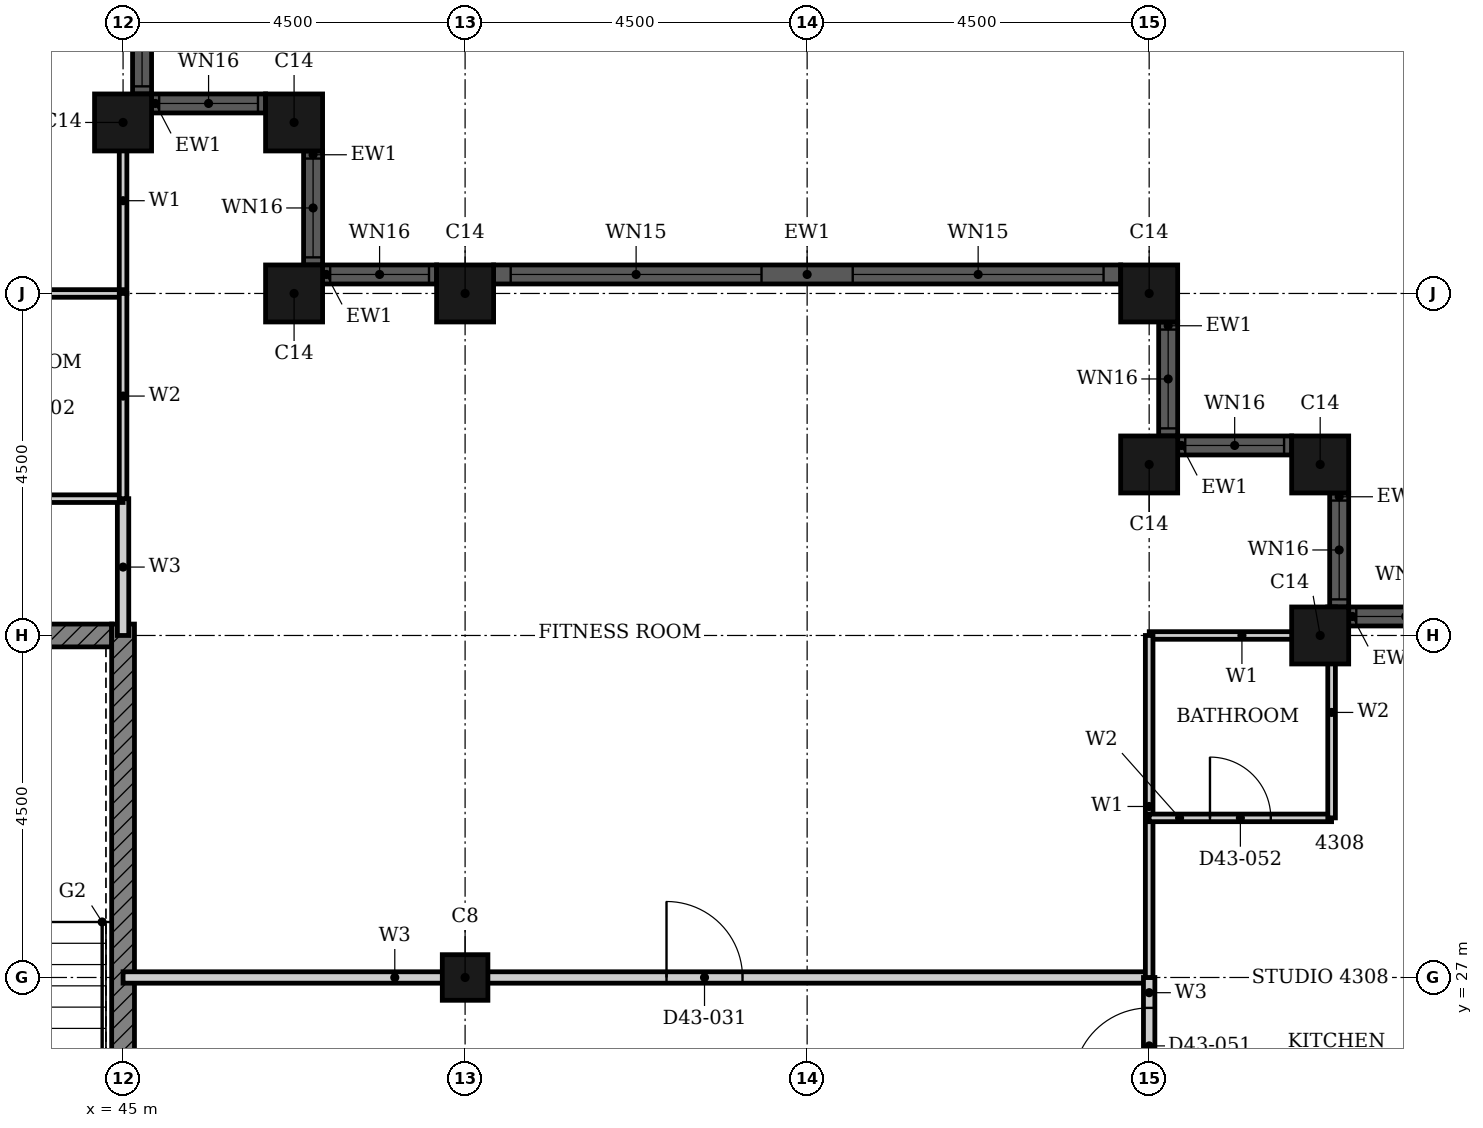
"""IFC4 building model, lengths in metres.
Left out: names, types, materials, properties, quantities, classifications, styles, units other than length and angle.
Written with IfcOpenShell. Run it as: python <this file> out.ifc"""

import sys

from ifc_helpers import new_model, si_unit, direction, frame, frame_2d, origin, origin_2d, place, context, subcontext, project, spatial, rectangle, hollow_rectangle, extrude, element, fill, save


model = new_model("IFC4")
c1 = context("Model", 3, precision=1e-05, world=origin(), true_north=direction((0.0, 1.0)))
c2 = subcontext(c1, "Body", "Model", "MODEL_VIEW")
j1 = project(units=[si_unit("LENGTHUNIT", "METRE"), si_unit("PLANEANGLEUNIT", "RADIAN")], contexts=[c1])
p1 = place(None, origin())
s1 = spatial("IfcSite", under=j1, at=p1, CompositionType="ELEMENT")
p2 = place(p1, origin())
s2 = spatial("IfcBuilding", under=s1, at=p2, CompositionType="ELEMENT")
p3 = place(p2, frame((0.0, 0.0, 172.8)))
s3 = spatial("IfcBuildingStorey", under=s2, at=p3, CompositionType="ELEMENT", Elevation=172.8)
for number, where, z_axis, x_axis in (
    (1, (60.75, 31.5, 0.0), (0.0, 0.0, 1.0), (1.0, 0.0, 0.0)),
    (2, (60.75, 33.75, 0.0), (0.0, 0.0, 1.0), (1.0, 0.0, 0.0)),
    (3, (58.5, 33.75, 0.0), (0.0, 0.0, 1.0), (1.0, 0.0, 0.0)),
    (4, (58.5, 36.0, 0.0), (0.0, 0.0, 1.0), (1.0, 0.0, 0.0)),
    (5, (49.5, 36.0, 0.0), (0.0, 0.0, 1.0), (1.0, 0.0, 0.0)),
    (6, (47.25, 36.0, 0.0), (0.0, 0.0, 1.0), (1.0, 0.0, 0.0)),
    (7, (47.25, 38.25, 0.0), (0.0, 0.0, 1.0), (1.0, 0.0, 0.0)),
    (8, (45.0, 38.25, 0.0), (0.0, 0.0, 1.0), (1.0, 0.0, 0.0)),
):
    element("IfcColumn", number, at=place(p3, frame(where, z_axis=z_axis, x_axis=x_axis)), inside=s3, PredefinedType="COLUMN", context=c2, shape_type="SweptSolid", body=[
        extrude(hollow_rectangle(XDim=0.75, YDim=0.75, WallThickness=0.024, at=origin_2d()), origin(), (0.0, 0.0, 1.0), 3.7),
    ])
p4 = place(p3, frame((49.5, 27.0, 0.0), z_axis=(0.0, 0.0, 1.0), x_axis=(1.0, 0.0, 0.0)))
e9 = element("IfcColumn", 9, at=p4, inside=s3, PredefinedType="COLUMN", context=c2, shape_type="SweptSolid", body=[
    extrude(hollow_rectangle(XDim=0.6, YDim=0.6, WallThickness=0.02, at=origin_2d()), origin(), (0.0, 0.0, 1.0), 3.7),
])
p5 = place(p3, frame((62.625, 31.75, 0.0), z_axis=(0.0, 0.0, 1.0), x_axis=(-1.0, 0.0, 0.0)))
e10 = element("IfcWall", 10, at=p5, inside=s3, PredefinedType="SOLIDWALL", context=c2, shape_type="SweptSolid", body=[
    extrude(rectangle(XDim=1.5, YDim=0.25, at=frame_2d((0.75, 0.0))), origin(), (0.0, 0.0, 1.0), 3.7),
])
p6 = place(p5, frame((0.1, 0.0, 0.9)))
e11 = element("IfcOpeningElement", 11, at=p6, cuts=e10, PredefinedType="OPENING", context=c2, shape_type="SweptSolid", body=[
    extrude(rectangle(XDim=1.3, YDim=1.85, at=frame_2d((0.65, 0.925))), frame((0.0, 0.135, 0.0), z_axis=(0.0, -1.0, 0.0), x_axis=(1.0, 0.0, 0.0)), (0.0, 0.0, 1.0), 0.27),
])
p7 = place(p3, frame((61.0, 31.875, 0.0), z_axis=(0.0, 0.0, 1.0), x_axis=(0.0, 1.0, 0.0)))
e12 = element("IfcWall", 12, at=p7, inside=s3, PredefinedType="SOLIDWALL", context=c2, shape_type="SweptSolid", body=[
    extrude(rectangle(XDim=1.5, YDim=0.25, at=frame_2d((0.75, 0.0))), origin(), (0.0, 0.0, 1.0), 3.7),
])
p8 = place(p7, frame((0.1, 0.0, 0.9)))
e13 = element("IfcOpeningElement", 13, at=p8, cuts=e12, PredefinedType="OPENING", context=c2, shape_type="SweptSolid", body=[
    extrude(rectangle(XDim=1.3, YDim=1.85, at=frame_2d((0.65, 0.925))), frame((0.0, 0.135, 0.0), z_axis=(0.0, -1.0, 0.0), x_axis=(1.0, 0.0, 0.0)), (0.0, 0.0, 1.0), 0.27),
])
p9 = place(p3, frame((60.375, 34.0, 0.0), z_axis=(0.0, 0.0, 1.0), x_axis=(-1.0, 0.0, 0.0)))
e14 = element("IfcWall", 14, at=p9, inside=s3, PredefinedType="SOLIDWALL", context=c2, shape_type="SweptSolid", body=[
    extrude(rectangle(XDim=1.5, YDim=0.25, at=frame_2d((0.75, 0.0))), origin(), (0.0, 0.0, 1.0), 3.7),
])
p10 = place(p9, frame((0.1, 0.0, 0.9)))
e15 = element("IfcOpeningElement", 15, at=p10, cuts=e14, PredefinedType="OPENING", context=c2, shape_type="SweptSolid", body=[
    extrude(rectangle(XDim=1.3, YDim=1.85, at=frame_2d((0.65, 0.925))), frame((0.0, 0.135, 0.0), z_axis=(0.0, -1.0, 0.0), x_axis=(1.0, 0.0, 0.0)), (0.0, 0.0, 1.0), 0.27),
])
p11 = place(p3, frame((58.75, 34.125, 0.0), z_axis=(0.0, 0.0, 1.0), x_axis=(0.0, 1.0, 0.0)))
e16 = element("IfcWall", 16, at=p11, inside=s3, PredefinedType="SOLIDWALL", context=c2, shape_type="SweptSolid", body=[
    extrude(rectangle(XDim=1.5, YDim=0.25, at=frame_2d((0.75, 0.0))), origin(), (0.0, 0.0, 1.0), 3.7),
])
p12 = place(p11, frame((0.1, 0.0, 0.9)))
e17 = element("IfcOpeningElement", 17, at=p12, cuts=e16, PredefinedType="OPENING", context=c2, shape_type="SweptSolid", body=[
    extrude(rectangle(XDim=1.3, YDim=1.85, at=frame_2d((0.65, 0.925))), frame((0.0, 0.135, 0.0), z_axis=(0.0, -1.0, 0.0), x_axis=(1.0, 0.0, 0.0)), (0.0, 0.0, 1.0), 0.27),
])
p13 = place(p3, frame((58.125, 36.25, 0.0), z_axis=(0.0, 0.0, 1.0), x_axis=(-1.0, 0.0, 0.0)))
e18 = element("IfcWall", 18, at=p13, inside=s3, PredefinedType="SOLIDWALL", context=c2, shape_type="SweptSolid", body=[
    extrude(rectangle(XDim=8.25, YDim=0.25, at=frame_2d((4.125, 0.0))), origin(), (0.0, 0.0, 1.0), 3.7),
])
p14 = place(p13, frame((0.225, 0.0, 0.45)))
e19 = element("IfcOpeningElement", 19, at=p14, cuts=e18, PredefinedType="OPENING", context=c2, shape_type="SweptSolid", body=[
    extrude(rectangle(XDim=3.3, YDim=2.3, at=frame_2d((1.65, 1.15))), frame((0.0, 0.135, 0.0), z_axis=(0.0, -1.0, 0.0), x_axis=(1.0, 0.0, 0.0)), (0.0, 0.0, 1.0), 0.27),
])
p15 = place(p13, frame((4.725, 0.0, 0.45)))
e20 = element("IfcOpeningElement", 20, at=p15, cuts=e18, PredefinedType="OPENING", context=c2, shape_type="SweptSolid", body=[
    extrude(rectangle(XDim=3.3, YDim=2.3, at=frame_2d((1.65, 1.15))), frame((0.0, 0.135, 0.0), z_axis=(0.0, -1.0, 0.0), x_axis=(1.0, 0.0, 0.0)), (0.0, 0.0, 1.0), 0.27),
])
p16 = place(p3, frame((49.125, 36.25, 0.0), z_axis=(0.0, 0.0, 1.0), x_axis=(-1.0, 0.0, 0.0)))
e21 = element("IfcWall", 21, at=p16, inside=s3, PredefinedType="SOLIDWALL", context=c2, shape_type="SweptSolid", body=[
    extrude(rectangle(XDim=1.5, YDim=0.25, at=frame_2d((0.75, 0.0))), origin(), (0.0, 0.0, 1.0), 3.7),
])
p17 = place(p16, frame((0.1, 0.0, 0.9)))
e22 = element("IfcOpeningElement", 22, at=p17, cuts=e21, PredefinedType="OPENING", context=c2, shape_type="SweptSolid", body=[
    extrude(rectangle(XDim=1.3, YDim=1.85, at=frame_2d((0.65, 0.925))), frame((0.0, 0.135, 0.0), z_axis=(0.0, -1.0, 0.0), x_axis=(1.0, 0.0, 0.0)), (0.0, 0.0, 1.0), 0.27),
])
p18 = place(p3, frame((47.5, 36.375, 0.0), z_axis=(0.0, 0.0, 1.0), x_axis=(0.0, 1.0, 0.0)))
e23 = element("IfcWall", 23, at=p18, inside=s3, PredefinedType="SOLIDWALL", context=c2, shape_type="SweptSolid", body=[
    extrude(rectangle(XDim=1.5, YDim=0.25, at=frame_2d((0.75, 0.0))), origin(), (0.0, 0.0, 1.0), 3.7),
])
p19 = place(p18, frame((0.1, 0.0, 0.9)))
e24 = element("IfcOpeningElement", 24, at=p19, cuts=e23, PredefinedType="OPENING", context=c2, shape_type="SweptSolid", body=[
    extrude(rectangle(XDim=1.3, YDim=1.85, at=frame_2d((0.65, 0.925))), frame((0.0, 0.135, 0.0), z_axis=(0.0, -1.0, 0.0), x_axis=(1.0, 0.0, 0.0)), (0.0, 0.0, 1.0), 0.27),
])
p20 = place(p3, frame((46.875, 38.5, 0.0), z_axis=(0.0, 0.0, 1.0), x_axis=(-1.0, 0.0, 0.0)))
e25 = element("IfcWall", 25, at=p20, inside=s3, PredefinedType="SOLIDWALL", context=c2, shape_type="SweptSolid", body=[
    extrude(rectangle(XDim=1.5, YDim=0.25, at=frame_2d((0.75, 0.0))), origin(), (0.0, 0.0, 1.0), 3.7),
])
p21 = place(p20, frame((0.1, 0.0, 0.9)))
e26 = element("IfcOpeningElement", 26, at=p21, cuts=e25, PredefinedType="OPENING", context=c2, shape_type="SweptSolid", body=[
    extrude(rectangle(XDim=1.3, YDim=1.85, at=frame_2d((0.65, 0.925))), frame((0.0, 0.135, 0.0), z_axis=(0.0, -1.0, 0.0), x_axis=(1.0, 0.0, 0.0)), (0.0, 0.0, 1.0), 0.27),
])
p22 = place(p3, frame((45.25, 38.625, 0.0), z_axis=(0.0, 0.0, 1.0), x_axis=(0.0, 1.0, 0.0)))
e27 = element("IfcWall", 27, at=p22, inside=s3, PredefinedType="SOLIDWALL", context=c2, shape_type="SweptSolid", body=[
    extrude(rectangle(XDim=1.5, YDim=0.25, at=frame_2d((0.75, 0.0))), origin(), (0.0, 0.0, 1.0), 3.7),
])
p23 = place(p22, frame((0.1, 0.0, 0.9)))
e28 = element("IfcOpeningElement", 28, at=p23, cuts=e27, PredefinedType="OPENING", context=c2, shape_type="SweptSolid", body=[
    extrude(rectangle(XDim=1.3, YDim=1.85, at=frame_2d((0.65, 0.925))), frame((0.0, 0.135, 0.0), z_axis=(0.0, -1.0, 0.0), x_axis=(1.0, 0.0, 0.0)), (0.0, 0.0, 1.0), 0.27),
])
p24 = place(p3, frame((40.625, 31.5, 0.0), z_axis=(0.0, 0.0, 1.0), x_axis=(1.0, 0.0, 0.0)))
e29 = element("IfcWall", 29, at=p24, inside=s3, PredefinedType="SHEAR", context=c2, shape_type="SweptSolid", body=[
    extrude(rectangle(XDim=4.225, YDim=0.3, at=frame_2d((2.113, 0.0))), origin(), (0.0, 0.0, 1.0), 3.4),
])
p25 = place(p3, frame((45.0, 22.35, 0.0), z_axis=(0.0, 0.0, 1.0), x_axis=(0.0, 1.0, 0.0)))
e30 = element("IfcWall", 30, at=p25, inside=s3, PredefinedType="SHEAR", context=c2, shape_type="SweptSolid", body=[
    extrude(rectangle(XDim=9.3, YDim=0.3, at=frame_2d((4.65, 0.0))), origin(), (0.0, 0.0, 1.0), 3.4),
])
p26 = place(p3, frame((45.0, 27.0, 0.0), z_axis=(0.0, 0.0, 1.0), x_axis=(1.0, 0.0, 0.0)))
e31 = element("IfcWall", 31, at=p26, inside=s3, PredefinedType="PARTITIONING", context=c2, shape_type="SweptSolid", body=[
    extrude(rectangle(XDim=13.5, YDim=0.15, at=frame_2d((6.75, 0.0))), origin(), (0.0, 0.0, 1.0), 2.68),
])
p27 = place(p26, frame((7.15, 0.0, 0.0)))
e32 = element("IfcOpeningElement", 32, at=p27, cuts=e31, PredefinedType="OPENING", context=c2, shape_type="SweptSolid", body=[
    extrude(rectangle(XDim=1.0, YDim=2.1, at=frame_2d((0.5, 1.05))), frame((0.0, 0.085, 0.0), z_axis=(0.0, -1.0, 0.0), x_axis=(1.0, 0.0, 0.0)), (0.0, 0.0, 1.0), 0.17),
])
p28 = place(p3, frame((45.0, 31.5, 0.0), z_axis=(0.0, 0.0, 1.0), x_axis=(0.0, 1.0, 0.0)))
e33 = element("IfcWall", 33, at=p28, inside=s3, PredefinedType="PARTITIONING", context=c2, shape_type="SweptSolid", body=[
    extrude(rectangle(XDim=1.8, YDim=0.15, at=frame_2d((0.9, 0.0))), origin(), (0.0, 0.0, 1.0), 3.4),
])
p29 = place(p3, frame((58.5, 25.2, 0.0), z_axis=(0.0, 0.0, 1.0), x_axis=(0.0, 1.0, 0.0)))
e34 = element("IfcWall", 34, at=p29, inside=s3, PredefinedType="PARTITIONING", context=c2, shape_type="SweptSolid", body=[
    extrude(rectangle(XDim=1.8, YDim=0.15, at=frame_2d((0.9, 0.0))), origin(), (0.0, 0.0, 1.0), 3.4),
])
p30 = place(p29, frame((0.4, 0.0, 0.0)))
e35 = element("IfcOpeningElement", 35, at=p30, cuts=e34, PredefinedType="OPENING", context=c2, shape_type="SweptSolid", body=[
    extrude(rectangle(XDim=1.0, YDim=2.2, at=frame_2d((0.5, 1.1))), frame((0.0, 0.085, 0.0), z_axis=(0.0, -1.0, 0.0), x_axis=(1.0, 0.0, 0.0)), (0.0, 0.0, 1.0), 0.17),
])
p31 = place(p3, frame((58.501, 31.5, 0.0), z_axis=(0.0, 0.0, 1.0), x_axis=(1.0, 0.0, 0.0)))
e36 = element("IfcWall", 36, at=p31, inside=s3, PredefinedType="PARTITIONING", context=c2, shape_type="SweptSolid", body=[
    extrude(rectangle(XDim=2.439, YDim=0.1, at=frame_2d((1.219, 0.0))), origin(), (0.0, 0.0, 1.0), 2.68),
])
p32 = place(p3, frame((45.0, 36.001, 0.0), z_axis=(0.0, 0.0, 1.0), x_axis=(0.0, 1.0, 0.0)))
e37 = element("IfcWall", 37, at=p32, inside=s3, PredefinedType="PARTITIONING", context=c2, shape_type="SweptSolid", body=[
    extrude(rectangle(XDim=2.439, YDim=0.1, at=frame_2d((1.219, 0.0))), origin(), (0.0, 0.0, 1.0), 3.4),
])
p33 = place(p3, frame((58.5, 27.0, 0.0), z_axis=(0.0, 0.0, 1.0), x_axis=(0.0, 1.0, 0.0)))
e38 = element("IfcWall", 38, at=p33, inside=s3, PredefinedType="PARTITIONING", context=c2, shape_type="SweptSolid", body=[
    extrude(rectangle(XDim=4.5, YDim=0.1, at=frame_2d((2.25, 0.0))), origin(), (0.0, 0.0, 1.0), 3.4),
])
p34 = place(p3, frame((58.5, 29.1, 0.0), z_axis=(0.0, 0.0, 1.0), x_axis=(1.0, 0.0, 0.0)))
e39 = element("IfcWall", 39, at=p34, inside=s3, PredefinedType="PARTITIONING", context=c2, shape_type="SweptSolid", body=[
    extrude(rectangle(XDim=2.4, YDim=0.1, at=frame_2d((1.2, 0.0))), origin(), (0.0, 0.0, 1.0), 3.4),
])
p35 = place(p34, frame((0.8, 0.0, 0.0)))
e40 = element("IfcOpeningElement", 40, at=p35, cuts=e39, PredefinedType="OPENING", context=c2, shape_type="SweptSolid", body=[
    extrude(rectangle(XDim=0.8, YDim=2.1, at=frame_2d((0.4, 1.05))), frame((0.0, 0.06, 0.0), z_axis=(0.0, -1.0, 0.0), x_axis=(1.0, 0.0, 0.0)), (0.0, 0.0, 1.0), 0.12),
])
for number, where, z_axis, x_axis in (
    (41, (42.0, 33.3, 0.0), (0.0, 0.0, 1.0), (1.0, 0.0, 0.0)),
    (42, (42.0, 36.0, 0.0), (0.0, 0.0, 1.0), (1.0, 0.0, 0.0)),
):
    element("IfcWall", number, at=place(p3, frame(where, z_axis=z_axis, x_axis=x_axis)), inside=s3, PredefinedType="PARTITIONING", context=c2, shape_type="SweptSolid", body=[
        extrude(rectangle(XDim=3.0, YDim=0.1, at=frame_2d((1.5, 0.0))), origin(), (0.0, 0.0, 1.0), 3.4),
    ])
p36 = place(p3, frame((45.0, 33.3, 0.0), z_axis=(0.0, 0.0, 1.0), x_axis=(0.0, 1.0, 0.0)))
e43 = element("IfcWall", 43, at=p36, inside=s3, PredefinedType="PARTITIONING", context=c2, shape_type="SweptSolid", body=[
    extrude(rectangle(XDim=2.7, YDim=0.1, at=frame_2d((1.35, 0.0))), origin(), (0.0, 0.0, 1.0), 3.4),
])
p37 = place(p3, frame((60.9, 29.1, 0.0), z_axis=(0.0, 0.0, 1.0), x_axis=(0.0, 1.0, 0.0)))
e44 = element("IfcWall", 44, at=p37, inside=s3, PredefinedType="PARTITIONING", context=c2, shape_type="SweptSolid", body=[
    extrude(rectangle(XDim=2.775, YDim=0.1, at=frame_2d((1.387, 0.0))), origin(), (0.0, 0.0, 1.0), 3.4),
])
p38 = place(p6, origin())
e45 = element("IfcWindow", 45, at=p38, inside=s3, PartitioningType="SINGLE_PANEL", PredefinedType="WINDOW", context=c2, shape_type="SweptSolid", body=[
    extrude(rectangle(XDim=1.3, YDim=1.85, at=frame_2d((0.65, 0.925))), frame((0.0, 0.03, 0.0), z_axis=(0.0, -1.0, 0.0), x_axis=(1.0, 0.0, 0.0)), (0.0, 0.0, 1.0), 0.06),
])
fill(e11, e45)
p39 = place(p8, origin())
e46 = element("IfcWindow", 46, at=p39, inside=s3, PartitioningType="SINGLE_PANEL", PredefinedType="WINDOW", context=c2, shape_type="SweptSolid", body=[
    extrude(rectangle(XDim=1.3, YDim=1.85, at=frame_2d((0.65, 0.925))), frame((0.0, 0.03, 0.0), z_axis=(0.0, -1.0, 0.0), x_axis=(1.0, 0.0, 0.0)), (0.0, 0.0, 1.0), 0.06),
])
fill(e13, e46)
p40 = place(p10, origin())
e47 = element("IfcWindow", 47, at=p40, inside=s3, PartitioningType="SINGLE_PANEL", PredefinedType="WINDOW", context=c2, shape_type="SweptSolid", body=[
    extrude(rectangle(XDim=1.3, YDim=1.85, at=frame_2d((0.65, 0.925))), frame((0.0, 0.03, 0.0), z_axis=(0.0, -1.0, 0.0), x_axis=(1.0, 0.0, 0.0)), (0.0, 0.0, 1.0), 0.06),
])
fill(e15, e47)
p41 = place(p12, origin())
e48 = element("IfcWindow", 48, at=p41, inside=s3, PartitioningType="SINGLE_PANEL", PredefinedType="WINDOW", context=c2, shape_type="SweptSolid", body=[
    extrude(rectangle(XDim=1.3, YDim=1.85, at=frame_2d((0.65, 0.925))), frame((0.0, 0.03, 0.0), z_axis=(0.0, -1.0, 0.0), x_axis=(1.0, 0.0, 0.0)), (0.0, 0.0, 1.0), 0.06),
])
fill(e17, e48)
p42 = place(p14, origin())
e49 = element("IfcWindow", 49, at=p42, inside=s3, PartitioningType="SINGLE_PANEL", PredefinedType="WINDOW", context=c2, shape_type="SweptSolid", body=[
    extrude(rectangle(XDim=3.3, YDim=2.3, at=frame_2d((1.65, 1.15))), frame((0.0, 0.03, 0.0), z_axis=(0.0, -1.0, 0.0), x_axis=(1.0, 0.0, 0.0)), (0.0, 0.0, 1.0), 0.06),
])
fill(e19, e49)
p43 = place(p15, origin())
e50 = element("IfcWindow", 50, at=p43, inside=s3, PartitioningType="SINGLE_PANEL", PredefinedType="WINDOW", context=c2, shape_type="SweptSolid", body=[
    extrude(rectangle(XDim=3.3, YDim=2.3, at=frame_2d((1.65, 1.15))), frame((0.0, 0.03, 0.0), z_axis=(0.0, -1.0, 0.0), x_axis=(1.0, 0.0, 0.0)), (0.0, 0.0, 1.0), 0.06),
])
fill(e20, e50)
p44 = place(p17, origin())
e51 = element("IfcWindow", 51, at=p44, inside=s3, PartitioningType="SINGLE_PANEL", PredefinedType="WINDOW", context=c2, shape_type="SweptSolid", body=[
    extrude(rectangle(XDim=1.3, YDim=1.85, at=frame_2d((0.65, 0.925))), frame((0.0, 0.03, 0.0), z_axis=(0.0, -1.0, 0.0), x_axis=(1.0, 0.0, 0.0)), (0.0, 0.0, 1.0), 0.06),
])
fill(e22, e51)
p45 = place(p19, origin())
e52 = element("IfcWindow", 52, at=p45, inside=s3, PartitioningType="SINGLE_PANEL", PredefinedType="WINDOW", context=c2, shape_type="SweptSolid", body=[
    extrude(rectangle(XDim=1.3, YDim=1.85, at=frame_2d((0.65, 0.925))), frame((0.0, 0.03, 0.0), z_axis=(0.0, -1.0, 0.0), x_axis=(1.0, 0.0, 0.0)), (0.0, 0.0, 1.0), 0.06),
])
fill(e24, e52)
p46 = place(p21, origin())
e53 = element("IfcWindow", 53, at=p46, inside=s3, PartitioningType="SINGLE_PANEL", PredefinedType="WINDOW", context=c2, shape_type="SweptSolid", body=[
    extrude(rectangle(XDim=1.3, YDim=1.85, at=frame_2d((0.65, 0.925))), frame((0.0, 0.03, 0.0), z_axis=(0.0, -1.0, 0.0), x_axis=(1.0, 0.0, 0.0)), (0.0, 0.0, 1.0), 0.06),
])
fill(e26, e53)
p47 = place(p23, origin())
e54 = element("IfcWindow", 54, at=p47, inside=s3, PartitioningType="SINGLE_PANEL", PredefinedType="WINDOW", context=c2, shape_type="SweptSolid", body=[
    extrude(rectangle(XDim=1.3, YDim=1.85, at=frame_2d((0.65, 0.925))), frame((0.0, 0.03, 0.0), z_axis=(0.0, -1.0, 0.0), x_axis=(1.0, 0.0, 0.0)), (0.0, 0.0, 1.0), 0.06),
])
fill(e28, e54)
p48 = place(p27, origin())
e55 = element("IfcDoor", 55, at=p48, inside=s3, OperationType="SINGLE_SWING_RIGHT", PredefinedType="DOOR", context=c2, shape_type="SweptSolid", body=[
    extrude(rectangle(XDim=1.0, YDim=2.1, at=frame_2d((0.5, 1.05))), frame((0.0, 0.025, 0.0), z_axis=(0.0, -1.0, 0.0), x_axis=(1.0, 0.0, 0.0)), (0.0, 0.0, 1.0), 0.05),
])
fill(e32, e55)
p49 = place(p30, origin())
e56 = element("IfcDoor", 56, at=p49, inside=s3, OperationType="SINGLE_SWING_LEFT", PredefinedType="DOOR", context=c2, shape_type="SweptSolid", body=[
    extrude(rectangle(XDim=1.0, YDim=2.2, at=frame_2d((0.5, 1.1))), frame((0.0, 0.025, 0.0), z_axis=(0.0, -1.0, 0.0), x_axis=(1.0, 0.0, 0.0)), (0.0, 0.0, 1.0), 0.05),
])
fill(e35, e56)
p50 = place(p35, origin())
e57 = element("IfcDoor", 57, at=p50, inside=s3, OperationType="SINGLE_SWING_LEFT", PredefinedType="DOOR", context=c2, shape_type="SweptSolid", body=[
    extrude(rectangle(XDim=0.8, YDim=2.1, at=frame_2d((0.4, 1.05))), frame((0.0, 0.025, 0.0), z_axis=(0.0, -1.0, 0.0), x_axis=(1.0, 0.0, 0.0)), (0.0, 0.0, 1.0), 0.05),
])
fill(e40, e57)
save(model, sys.argv[1])
